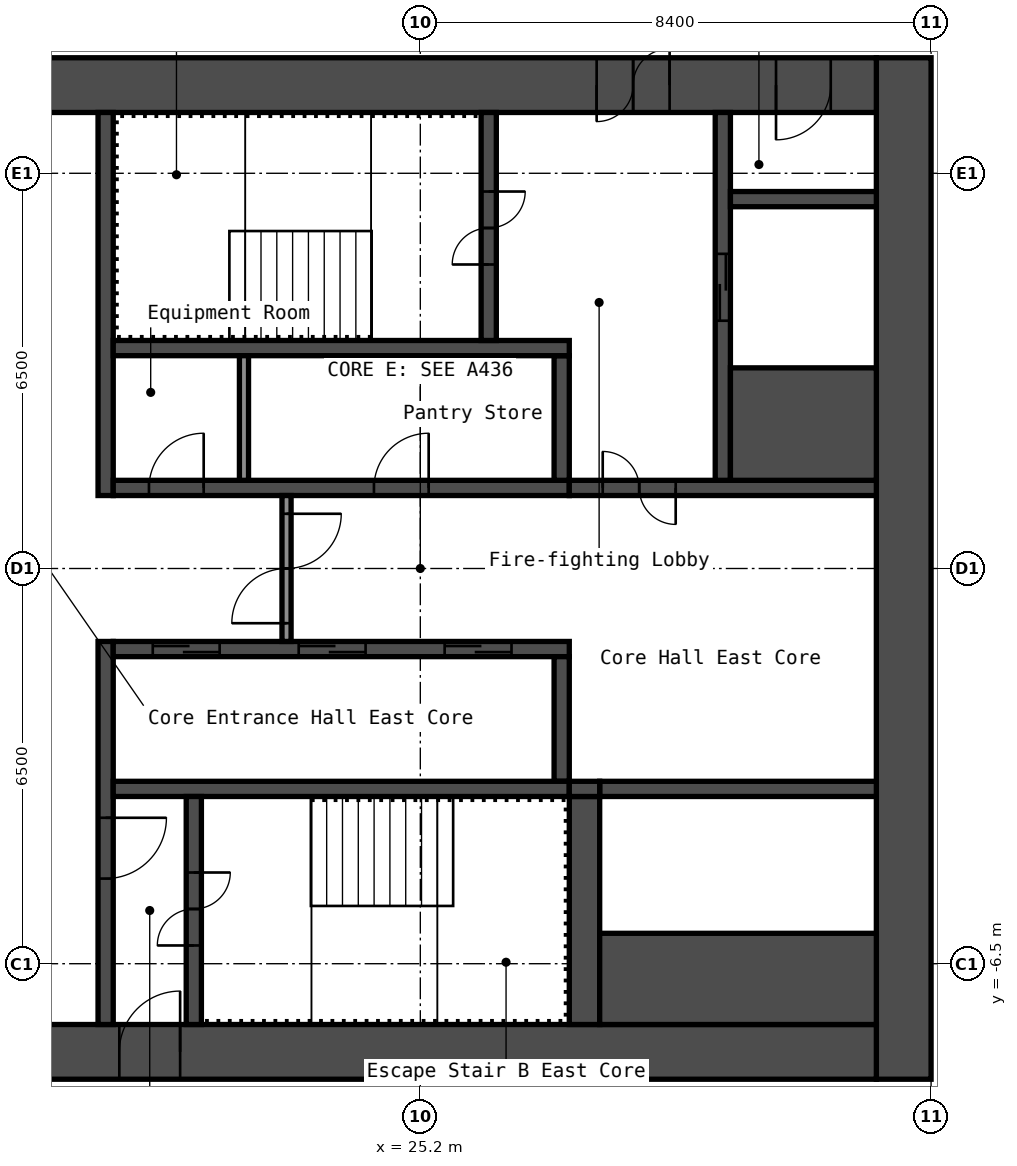
"""IFC4 building model, lengths in metres.
Left out: names, types, materials, properties, quantities, classifications, styles, units other than length and angle.
Written with IfcOpenShell. Run it as: python <this file> out.ifc"""

import sys

from ifc_helpers import new_model, si_unit, direction, frame, frame_2d, origin, place, context, subcontext, project, spatial, rectangle, extrude, element, fill, save


model = new_model("IFC4")
c1 = context("Model", 3, precision=1e-05, world=origin(), true_north=direction((0.0, 1.0)))
c2 = subcontext(c1, "Body", "Model", "MODEL_VIEW")
j1 = project(units=[si_unit("LENGTHUNIT", "METRE"), si_unit("PLANEANGLEUNIT", "RADIAN")], contexts=[c1])
p1 = place(None, origin())
s1 = spatial("IfcSite", under=j1, at=p1, CompositionType="ELEMENT")
p2 = place(p1, origin())
s2 = spatial("IfcBuilding", under=s1, at=p2, CompositionType="ELEMENT")
p3 = place(p2, frame((0.0, 0.0, 255.0)))
s3 = spatial("IfcBuildingStorey", under=s2, at=p3, CompositionType="ELEMENT", Elevation=255.0)
p4 = place(p3, frame((33.15, -8.4, 0.0), z_axis=(0.0, 0.0, 1.0), x_axis=(0.0, 1.0, 0.0)))
e1 = element("IfcWall", 1, at=p4, inside=s3, PredefinedType="SHEAR", context=c2, shape_type="SweptSolid", body=[
    extrude(rectangle(XDim=16.8, YDim=0.9, at=frame_2d((8.4, 0.0))), origin(), (0.0, 0.0, 1.0), 2.75),
])
p5 = place(p3, frame((17.7, 7.95, 0.0), z_axis=(0.0, 0.0, 1.0), x_axis=(1.0, 0.0, 0.0)))
e2 = element("IfcWall", 2, at=p5, inside=s3, PredefinedType="SHEAR", context=c2, shape_type="SweptSolid", body=[
    extrude(rectangle(XDim=15.0, YDim=0.9, at=frame_2d((7.5, 0.0))), origin(), (0.0, 0.0, 1.0), 2.75),
])
p6 = place(p5, frame((10.4, 0.0, 0.0)))
e3 = element("IfcOpeningElement", 3, at=p6, cuts=e2, PredefinedType="OPENING", context=c2, shape_type="SweptSolid", body=[
    extrude(rectangle(XDim=1.2, YDim=2.1, at=frame_2d((0.6, 1.05))), frame((0.0, 0.46, 0.0), z_axis=(0.0, -1.0, 0.0), x_axis=(1.0, 0.0, 0.0)), (0.0, 0.0, 1.0), 0.92),
])
p7 = place(p5, frame((13.35, 0.0, 0.0)))
e4 = element("IfcOpeningElement", 4, at=p7, cuts=e2, PredefinedType="OPENING", context=c2, shape_type="SweptSolid", body=[
    extrude(rectangle(XDim=0.9, YDim=2.1, at=frame_2d((0.45, 1.05))), frame((0.0, 0.46, 0.0), z_axis=(0.0, -1.0, 0.0), x_axis=(1.0, 0.0, 0.0)), (0.0, 0.0, 1.0), 0.92),
])
p8 = place(p3, frame((17.7, -7.95, 0.0), z_axis=(0.0, 0.0, 1.0), x_axis=(1.0, 0.0, 0.0)))
e5 = element("IfcWall", 5, at=p8, inside=s3, PredefinedType="SHEAR", context=c2, shape_type="SweptSolid", body=[
    extrude(rectangle(XDim=15.0, YDim=0.9, at=frame_2d((7.5, 0.0))), origin(), (0.0, 0.0, 1.0), 2.75),
])
p9 = place(p8, frame((2.55, 0.0, 0.0)))
e6 = element("IfcOpeningElement", 6, at=p9, cuts=e5, PredefinedType="OPENING", context=c2, shape_type="SweptSolid", body=[
    extrude(rectangle(XDim=1.0, YDim=2.1, at=frame_2d((0.5, 1.05))), frame((0.0, 0.46, 0.0), z_axis=(0.0, -1.0, 0.0), x_axis=(1.0, 0.0, 0.0)), (0.0, 0.0, 1.0), 0.92),
])
p10 = place(p3, frame((20.025, 1.2, 0.0), z_axis=(0.0, 0.0, 1.0), x_axis=(0.0, 1.0, 0.0)))
e7 = element("IfcWall", 7, at=p10, inside=s3, PredefinedType="SHEAR", context=c2, shape_type="SweptSolid", body=[
    extrude(rectangle(XDim=6.3, YDim=0.25, at=frame_2d((3.15, 0.0))), origin(), (0.0, 0.0, 1.0), 2.75),
])
p11 = place(p3, frame((20.025, -7.5, 0.0), z_axis=(0.0, 0.0, 1.0), x_axis=(0.0, 1.0, 0.0)))
e8 = element("IfcWall", 8, at=p11, inside=s3, PredefinedType="SHEAR", context=c2, shape_type="SweptSolid", body=[
    extrude(rectangle(XDim=6.3, YDim=0.25, at=frame_2d((3.15, 0.0))), origin(), (0.0, 0.0, 1.0), 2.75),
])
p12 = place(p11, frame((2.4, 0.0, 0.0)))
e9 = element("IfcOpeningElement", 9, at=p12, cuts=e8, PredefinedType="OPENING", context=c2, shape_type="SweptSolid", body=[
    extrude(rectangle(XDim=1.0, YDim=2.1, at=frame_2d((0.5, 1.05))), frame((0.0, 0.135, 0.0), z_axis=(0.0, -1.0, 0.0), x_axis=(1.0, 0.0, 0.0)), (0.0, 0.0, 1.0), 0.27),
])
p13 = place(p3, frame((20.15, 1.325, 0.0), z_axis=(0.0, 0.0, 1.0), x_axis=(1.0, 0.0, 0.0)))
e10 = element("IfcWall", 10, at=p13, inside=s3, PredefinedType="SHEAR", context=c2, shape_type="SweptSolid", body=[
    extrude(rectangle(XDim=7.5, YDim=0.25, at=frame_2d((3.75, 0.0))), origin(), (0.0, 0.0, 1.0), 2.75),
])
p14 = place(p13, frame((0.587, 0.0, 0.0)))
e11 = element("IfcOpeningElement", 11, at=p14, cuts=e10, PredefinedType="OPENING", context=c2, shape_type="SweptSolid", body=[
    extrude(rectangle(XDim=0.9, YDim=2.1, at=frame_2d((0.45, 1.05))), frame((0.0, 0.135, 0.0), z_axis=(0.0, -1.0, 0.0), x_axis=(1.0, 0.0, 0.0)), (0.0, 0.0, 1.0), 0.27),
])
p15 = place(p13, frame((4.288, 0.0, 0.0)))
e12 = element("IfcOpeningElement", 12, at=p15, cuts=e10, PredefinedType="OPENING", context=c2, shape_type="SweptSolid", body=[
    extrude(rectangle(XDim=0.9, YDim=2.1, at=frame_2d((0.45, 1.05))), frame((0.0, 0.135, 0.0), z_axis=(0.0, -1.0, 0.0), x_axis=(1.0, 0.0, 0.0)), (0.0, 0.0, 1.0), 0.27),
])
p16 = place(p3, frame((27.525, 1.45, 0.0), z_axis=(0.0, 0.0, 1.0), x_axis=(0.0, 1.0, 0.0)))
e13 = element("IfcWall", 13, at=p16, inside=s3, PredefinedType="SHEAR", context=c2, shape_type="SweptSolid", body=[
    extrude(rectangle(XDim=2.05, YDim=0.25, at=frame_2d((1.025, 0.0))), origin(), (0.0, 0.0, 1.0), 2.75),
])
p17 = place(p3, frame((20.15, 3.625, 0.0), z_axis=(0.0, 0.0, 1.0), x_axis=(1.0, 0.0, 0.0)))
e14 = element("IfcWall", 14, at=p17, inside=s3, PredefinedType="SHEAR", context=c2, shape_type="SweptSolid", body=[
    extrude(rectangle(XDim=7.5, YDim=0.25, at=frame_2d((3.75, 0.0))), origin(), (0.0, 0.0, 1.0), 2.75),
])
p18 = place(p3, frame((26.325, 3.75, 0.0), z_axis=(0.0, 0.0, 1.0), x_axis=(0.0, 1.0, 0.0)))
e15 = element("IfcWall", 15, at=p18, inside=s3, PredefinedType="SHEAR", context=c2, shape_type="SweptSolid", body=[
    extrude(rectangle(XDim=3.75, YDim=0.25, at=frame_2d((1.875, 0.0))), origin(), (0.0, 0.0, 1.0), 2.75),
])
p19 = place(p18, frame((1.25, 0.0, 0.0)))
e16 = element("IfcOpeningElement", 16, at=p19, cuts=e15, PredefinedType="OPENING", context=c2, shape_type="SweptSolid", body=[
    extrude(rectangle(XDim=1.2, YDim=2.1, at=frame_2d((0.6, 1.05))), frame((0.0, 0.135, 0.0), z_axis=(0.0, -1.0, 0.0), x_axis=(1.0, 0.0, 0.0)), (0.0, 0.0, 1.0), 0.27),
])
p20 = place(p3, frame((27.65, 1.325, 0.0), z_axis=(0.0, 0.0, 1.0), x_axis=(1.0, 0.0, 0.0)))
e17 = element("IfcWall", 17, at=p20, inside=s3, PredefinedType="SHEAR", context=c2, shape_type="SweptSolid", body=[
    extrude(rectangle(XDim=5.05, YDim=0.25, at=frame_2d((2.525, 0.0))), origin(), (0.0, 0.0, 1.0), 2.75),
])
p21 = place(p20, frame((0.55, 0.0, 0.0)))
e18 = element("IfcOpeningElement", 18, at=p21, cuts=e17, PredefinedType="OPENING", context=c2, shape_type="SweptSolid", body=[
    extrude(rectangle(XDim=1.2, YDim=2.1, at=frame_2d((0.6, 1.05))), frame((0.0, 0.135, 0.0), z_axis=(0.0, -1.0, 0.0), x_axis=(1.0, 0.0, 0.0)), (0.0, 0.0, 1.0), 0.27),
])
p22 = place(p3, frame((30.175, 1.45, 0.0), z_axis=(0.0, 0.0, 1.0), x_axis=(0.0, 1.0, 0.0)))
e19 = element("IfcWall", 19, at=p22, inside=s3, PredefinedType="SHEAR", context=c2, shape_type="SweptSolid", body=[
    extrude(rectangle(XDim=6.05, YDim=0.25, at=frame_2d((3.025, 0.0))), origin(), (0.0, 0.0, 1.0), 2.75),
])
p23 = place(p22, frame((2.625, 0.0, 0.0)))
e20 = element("IfcOpeningElement", 20, at=p23, cuts=e19, PredefinedType="OPENING", context=c2, shape_type="SweptSolid", body=[
    extrude(rectangle(XDim=1.1, YDim=2.1, at=frame_2d((0.55, 1.05))), frame((0.0, 0.135, 0.0), z_axis=(0.0, -1.0, 0.0), x_axis=(1.0, 0.0, 0.0)), (0.0, 0.0, 1.0), 0.27),
])
p24 = place(p3, frame((30.3, 2.375, 0.0), z_axis=(0.0, 0.0, 1.0), x_axis=(1.0, 0.0, 0.0)))
e21 = element("IfcWall", 21, at=p24, inside=s3, PredefinedType="SHEAR", context=c2, shape_type="SweptSolid", body=[
    extrude(rectangle(XDim=2.4, YDim=1.85, at=frame_2d((1.2, 0.0))), origin(), (0.0, 0.0, 1.0), 2.75),
])
p25 = place(p3, frame((30.3, 6.075, 0.0), z_axis=(0.0, 0.0, 1.0), x_axis=(1.0, 0.0, 0.0)))
e22 = element("IfcWall", 22, at=p25, inside=s3, PredefinedType="SHEAR", context=c2, shape_type="SweptSolid", body=[
    extrude(rectangle(XDim=2.4, YDim=0.25, at=frame_2d((1.2, 0.0))), origin(), (0.0, 0.0, 1.0), 2.75),
])
p26 = place(p3, frame((20.15, -1.325, 0.0), z_axis=(0.0, 0.0, 1.0), x_axis=(1.0, 0.0, 0.0)))
e23 = element("IfcWall", 23, at=p26, inside=s3, PredefinedType="SHEAR", context=c2, shape_type="SweptSolid", body=[
    extrude(rectangle(XDim=7.5, YDim=0.25, at=frame_2d((3.75, 0.0))), origin(), (0.0, 0.0, 1.0), 2.75),
])
p27 = place(p26, frame((0.65, 0.0, 0.0)))
e24 = element("IfcOpeningElement", 24, at=p27, cuts=e23, PredefinedType="OPENING", context=c2, shape_type="SweptSolid", body=[
    extrude(rectangle(XDim=1.1, YDim=2.1, at=frame_2d((0.55, 1.05))), frame((0.0, 0.135, 0.0), z_axis=(0.0, -1.0, 0.0), x_axis=(1.0, 0.0, 0.0)), (0.0, 0.0, 1.0), 0.27),
])
p28 = place(p26, frame((3.05, 0.0, 0.0)))
e25 = element("IfcOpeningElement", 25, at=p28, cuts=e23, PredefinedType="OPENING", context=c2, shape_type="SweptSolid", body=[
    extrude(rectangle(XDim=1.1, YDim=2.1, at=frame_2d((0.55, 1.05))), frame((0.0, 0.135, 0.0), z_axis=(0.0, -1.0, 0.0), x_axis=(1.0, 0.0, 0.0)), (0.0, 0.0, 1.0), 0.27),
])
p29 = place(p26, frame((5.45, 0.0, 0.0)))
e26 = element("IfcOpeningElement", 26, at=p29, cuts=e23, PredefinedType="OPENING", context=c2, shape_type="SweptSolid", body=[
    extrude(rectangle(XDim=1.1, YDim=2.1, at=frame_2d((0.55, 1.05))), frame((0.0, 0.135, 0.0), z_axis=(0.0, -1.0, 0.0), x_axis=(1.0, 0.0, 0.0)), (0.0, 0.0, 1.0), 0.27),
])
p30 = place(p3, frame((27.525, -3.5, 0.0), z_axis=(0.0, 0.0, 1.0), x_axis=(0.0, 1.0, 0.0)))
e27 = element("IfcWall", 27, at=p30, inside=s3, PredefinedType="SHEAR", context=c2, shape_type="SweptSolid", body=[
    extrude(rectangle(XDim=2.05, YDim=0.25, at=frame_2d((1.025, 0.0))), origin(), (0.0, 0.0, 1.0), 2.75),
])
p31 = place(p3, frame((20.15, -3.625, 0.0), z_axis=(0.0, 0.0, 1.0), x_axis=(1.0, 0.0, 0.0)))
e28 = element("IfcWall", 28, at=p31, inside=s3, PredefinedType="SHEAR", context=c2, shape_type="SweptSolid", body=[
    extrude(rectangle(XDim=7.5, YDim=0.25, at=frame_2d((3.75, 0.0))), origin(), (0.0, 0.0, 1.0), 2.75),
])
p32 = place(p3, frame((21.475, -7.5, 0.0), z_axis=(0.0, 0.0, 1.0), x_axis=(0.0, 1.0, 0.0)))
e29 = element("IfcWall", 29, at=p32, inside=s3, PredefinedType="SHEAR", context=c2, shape_type="SweptSolid", body=[
    extrude(rectangle(XDim=3.75, YDim=0.25, at=frame_2d((1.875, 0.0))), origin(), (0.0, 0.0, 1.0), 2.75),
])
p33 = place(p32, frame((1.3, 0.0, 0.0)))
e30 = element("IfcOpeningElement", 30, at=p33, cuts=e29, PredefinedType="OPENING", context=c2, shape_type="SweptSolid", body=[
    extrude(rectangle(XDim=1.2, YDim=2.1, at=frame_2d((0.6, 1.05))), frame((0.0, 0.135, 0.0), z_axis=(0.0, -1.0, 0.0), x_axis=(1.0, 0.0, 0.0)), (0.0, 0.0, 1.0), 0.27),
])
p34 = place(p3, frame((27.9, -7.5, 0.0), z_axis=(0.0, 0.0, 1.0), x_axis=(0.0, 1.0, 0.0)))
e31 = element("IfcWall", 31, at=p34, inside=s3, PredefinedType="SHEAR", context=c2, shape_type="SweptSolid", body=[
    extrude(rectangle(XDim=3.75, YDim=0.5, at=frame_2d((1.875, 0.0))), origin(), (0.0, 0.0, 1.0), 2.75),
])
p35 = place(p3, frame((28.15, -3.625, 0.0), z_axis=(0.0, 0.0, 1.0), x_axis=(1.0, 0.0, 0.0)))
e32 = element("IfcWall", 32, at=p35, inside=s3, PredefinedType="SHEAR", context=c2, shape_type="SweptSolid", body=[
    extrude(rectangle(XDim=4.55, YDim=0.25, at=frame_2d((2.275, 0.0))), origin(), (0.0, 0.0, 1.0), 2.75),
])
p36 = place(p3, frame((28.15, -6.75, 0.0), z_axis=(0.0, 0.0, 1.0), x_axis=(1.0, 0.0, 0.0)))
e33 = element("IfcWall", 33, at=p36, inside=s3, PredefinedType="SHEAR", context=c2, shape_type="SweptSolid", body=[
    extrude(rectangle(XDim=4.55, YDim=1.5, at=frame_2d((2.275, 0.0))), origin(), (0.0, 0.0, 1.0), 2.75),
])
p37 = place(p3, frame((27.65, -3.625, 0.0), z_axis=(0.0, 0.0, 1.0), x_axis=(1.0, 0.0, 0.0)))
e34 = element("IfcWall", 34, at=p37, inside=s3, PredefinedType="SHEAR", context=c2, shape_type="SweptSolid", body=[
    extrude(rectangle(XDim=0.5, YDim=0.25, at=frame_2d((0.25, 0.0))), origin(), (0.0, 0.0, 1.0), 2.75),
])
p38 = place(p3, frame((23.0, -1.2, 0.0), z_axis=(0.0, 0.0, 1.0), x_axis=(0.0, 1.0, 0.0)))
e35 = element("IfcWall", 35, at=p38, inside=s3, PredefinedType="PARTITIONING", context=c2, shape_type="SweptSolid", body=[
    extrude(rectangle(XDim=2.4, YDim=0.15, at=frame_2d((1.2, 0.0))), origin(), (0.0, 0.0, 1.0), 2.75),
])
p39 = place(p38, frame((0.3, 0.0, 0.0)))
e36 = element("IfcOpeningElement", 36, at=p39, cuts=e35, PredefinedType="OPENING", context=c2, shape_type="SweptSolid", body=[
    extrude(rectangle(XDim=1.8, YDim=2.1, at=frame_2d((0.9, 1.05))), frame((0.0, 0.085, 0.0), z_axis=(0.0, -1.0, 0.0), x_axis=(1.0, 0.0, 0.0)), (0.0, 0.0, 1.0), 0.17),
])
p40 = place(p3, frame((22.3, 1.45, 0.0), z_axis=(0.0, 0.0, 1.0), x_axis=(0.0, 1.0, 0.0)))
e37 = element("IfcWall", 37, at=p40, inside=s3, PredefinedType="PARTITIONING", context=c2, shape_type="SweptSolid", body=[
    extrude(rectangle(XDim=2.05, YDim=0.15, at=frame_2d((1.025, 0.0))), origin(), (0.0, 0.0, 1.0), 2.75),
])
p41 = place(p6, origin())
e38 = element("IfcDoor", 38, at=p41, inside=s3, OperationType="DOUBLE_DOOR_SINGLE_SWING", PredefinedType="DOOR", context=c2, shape_type="SweptSolid", body=[
    extrude(rectangle(XDim=1.2, YDim=2.1, at=frame_2d((0.6, 1.05))), frame((0.0, 0.025, 0.0), z_axis=(0.0, -1.0, 0.0), x_axis=(1.0, 0.0, 0.0)), (0.0, 0.0, 1.0), 0.05),
])
fill(e3, e38)
p42 = place(p7, origin())
e39 = element("IfcDoor", 39, at=p42, inside=s3, OperationType="SINGLE_SWING_LEFT", PredefinedType="DOOR", context=c2, shape_type="SweptSolid", body=[
    extrude(rectangle(XDim=0.9, YDim=2.1, at=frame_2d((0.45, 1.05))), frame((0.0, 0.025, 0.0), z_axis=(0.0, -1.0, 0.0), x_axis=(1.0, 0.0, 0.0)), (0.0, 0.0, 1.0), 0.05),
])
fill(e4, e39)
p43 = place(p9, origin())
e40 = element("IfcDoor", 40, at=p43, inside=s3, OperationType="SINGLE_SWING_LEFT", PredefinedType="DOOR", context=c2, shape_type="SweptSolid", body=[
    extrude(rectangle(XDim=1.0, YDim=2.1, at=frame_2d((0.5, 1.05))), frame((0.0, 0.025, 0.0), z_axis=(0.0, -1.0, 0.0), x_axis=(1.0, 0.0, 0.0)), (0.0, 0.0, 1.0), 0.05),
])
fill(e6, e40)
p44 = place(p19, origin())
e41 = element("IfcDoor", 41, at=p44, inside=s3, OperationType="DOUBLE_DOOR_SINGLE_SWING", PredefinedType="DOOR", context=c2, shape_type="SweptSolid", body=[
    extrude(rectangle(XDim=1.2, YDim=2.1, at=frame_2d((0.6, 1.05))), frame((0.0, 0.025, 0.0), z_axis=(0.0, -1.0, 0.0), x_axis=(1.0, 0.0, 0.0)), (0.0, 0.0, 1.0), 0.05),
])
fill(e16, e41)
p45 = place(p33, origin())
e42 = element("IfcDoor", 42, at=p45, inside=s3, OperationType="DOUBLE_DOOR_SINGLE_SWING", PredefinedType="DOOR", context=c2, shape_type="SweptSolid", body=[
    extrude(rectangle(XDim=1.2, YDim=2.1, at=frame_2d((0.6, 1.05))), frame((0.0, 0.025, 0.0), z_axis=(0.0, -1.0, 0.0), x_axis=(1.0, 0.0, 0.0)), (0.0, 0.0, 1.0), 0.05),
])
fill(e30, e42)
p46 = place(p12, origin())
e43 = element("IfcDoor", 43, at=p46, inside=s3, OperationType="SINGLE_SWING_RIGHT", PredefinedType="DOOR", context=c2, shape_type="SweptSolid", body=[
    extrude(rectangle(XDim=1.0, YDim=2.1, at=frame_2d((0.5, 1.05))), frame((0.0, 0.025, 0.0), z_axis=(0.0, -1.0, 0.0), x_axis=(1.0, 0.0, 0.0)), (0.0, 0.0, 1.0), 0.05),
])
fill(e9, e43)
p47 = place(p21, origin())
e44 = element("IfcDoor", 44, at=p47, inside=s3, OperationType="DOUBLE_DOOR_SINGLE_SWING", PredefinedType="DOOR", context=c2, shape_type="SweptSolid", body=[
    extrude(rectangle(XDim=1.2, YDim=2.1, at=frame_2d((0.6, 1.05))), frame((0.0, 0.025, 0.0), z_axis=(0.0, -1.0, 0.0), x_axis=(1.0, 0.0, 0.0)), (0.0, 0.0, 1.0), 0.05),
])
fill(e18, e44)
p48 = place(p39, origin())
e45 = element("IfcDoor", 45, at=p48, inside=s3, OperationType="DOUBLE_DOOR_SINGLE_SWING", PredefinedType="DOOR", context=c2, shape_type="SweptSolid", body=[
    extrude(rectangle(XDim=1.8, YDim=2.1, at=frame_2d((0.9, 1.05))), frame((0.0, 0.025, 0.0), z_axis=(0.0, -1.0, 0.0), x_axis=(1.0, 0.0, 0.0)), (0.0, 0.0, 1.0), 0.05),
])
fill(e36, e45)
p49 = place(p14, origin())
e46 = element("IfcDoor", 46, at=p49, inside=s3, OperationType="SINGLE_SWING_LEFT", PredefinedType="DOOR", context=c2, shape_type="SweptSolid", body=[
    extrude(rectangle(XDim=0.9, YDim=2.1, at=frame_2d((0.45, 1.05))), frame((0.0, 0.025, 0.0), z_axis=(0.0, -1.0, 0.0), x_axis=(1.0, 0.0, 0.0)), (0.0, 0.0, 1.0), 0.05),
])
fill(e11, e46)
p50 = place(p15, origin())
e47 = element("IfcDoor", 47, at=p50, inside=s3, OperationType="SINGLE_SWING_LEFT", PredefinedType="DOOR", context=c2, shape_type="SweptSolid", body=[
    extrude(rectangle(XDim=0.9, YDim=2.1, at=frame_2d((0.45, 1.05))), frame((0.0, 0.025, 0.0), z_axis=(0.0, -1.0, 0.0), x_axis=(1.0, 0.0, 0.0)), (0.0, 0.0, 1.0), 0.05),
])
fill(e12, e47)
p51 = place(p27, origin())
e48 = element("IfcDoor", 48, at=p51, inside=s3, OperationType="DOUBLE_DOOR_SLIDING", PredefinedType="DOOR", context=c2, shape_type="SweptSolid", body=[
    extrude(rectangle(XDim=1.1, YDim=2.1, at=frame_2d((0.55, 1.05))), frame((0.0, 0.025, 0.0), z_axis=(0.0, -1.0, 0.0), x_axis=(1.0, 0.0, 0.0)), (0.0, 0.0, 1.0), 0.05),
])
fill(e24, e48)
p52 = place(p28, origin())
e49 = element("IfcDoor", 49, at=p52, inside=s3, OperationType="DOUBLE_DOOR_SLIDING", PredefinedType="DOOR", context=c2, shape_type="SweptSolid", body=[
    extrude(rectangle(XDim=1.1, YDim=2.1, at=frame_2d((0.55, 1.05))), frame((0.0, 0.025, 0.0), z_axis=(0.0, -1.0, 0.0), x_axis=(1.0, 0.0, 0.0)), (0.0, 0.0, 1.0), 0.05),
])
fill(e25, e49)
p53 = place(p29, origin())
e50 = element("IfcDoor", 50, at=p53, inside=s3, OperationType="DOUBLE_DOOR_SLIDING", PredefinedType="DOOR", context=c2, shape_type="SweptSolid", body=[
    extrude(rectangle(XDim=1.1, YDim=2.1, at=frame_2d((0.55, 1.05))), frame((0.0, 0.025, 0.0), z_axis=(0.0, -1.0, 0.0), x_axis=(1.0, 0.0, 0.0)), (0.0, 0.0, 1.0), 0.05),
])
fill(e26, e50)
p54 = place(p23, origin())
e51 = element("IfcDoor", 51, at=p54, inside=s3, OperationType="DOUBLE_DOOR_SLIDING", PredefinedType="DOOR", context=c2, shape_type="SweptSolid", body=[
    extrude(rectangle(XDim=1.1, YDim=2.1, at=frame_2d((0.55, 1.05))), frame((0.0, 0.025, 0.0), z_axis=(0.0, -1.0, 0.0), x_axis=(1.0, 0.0, 0.0)), (0.0, 0.0, 1.0), 0.05),
])
fill(e20, e51)
save(model, sys.argv[1])
